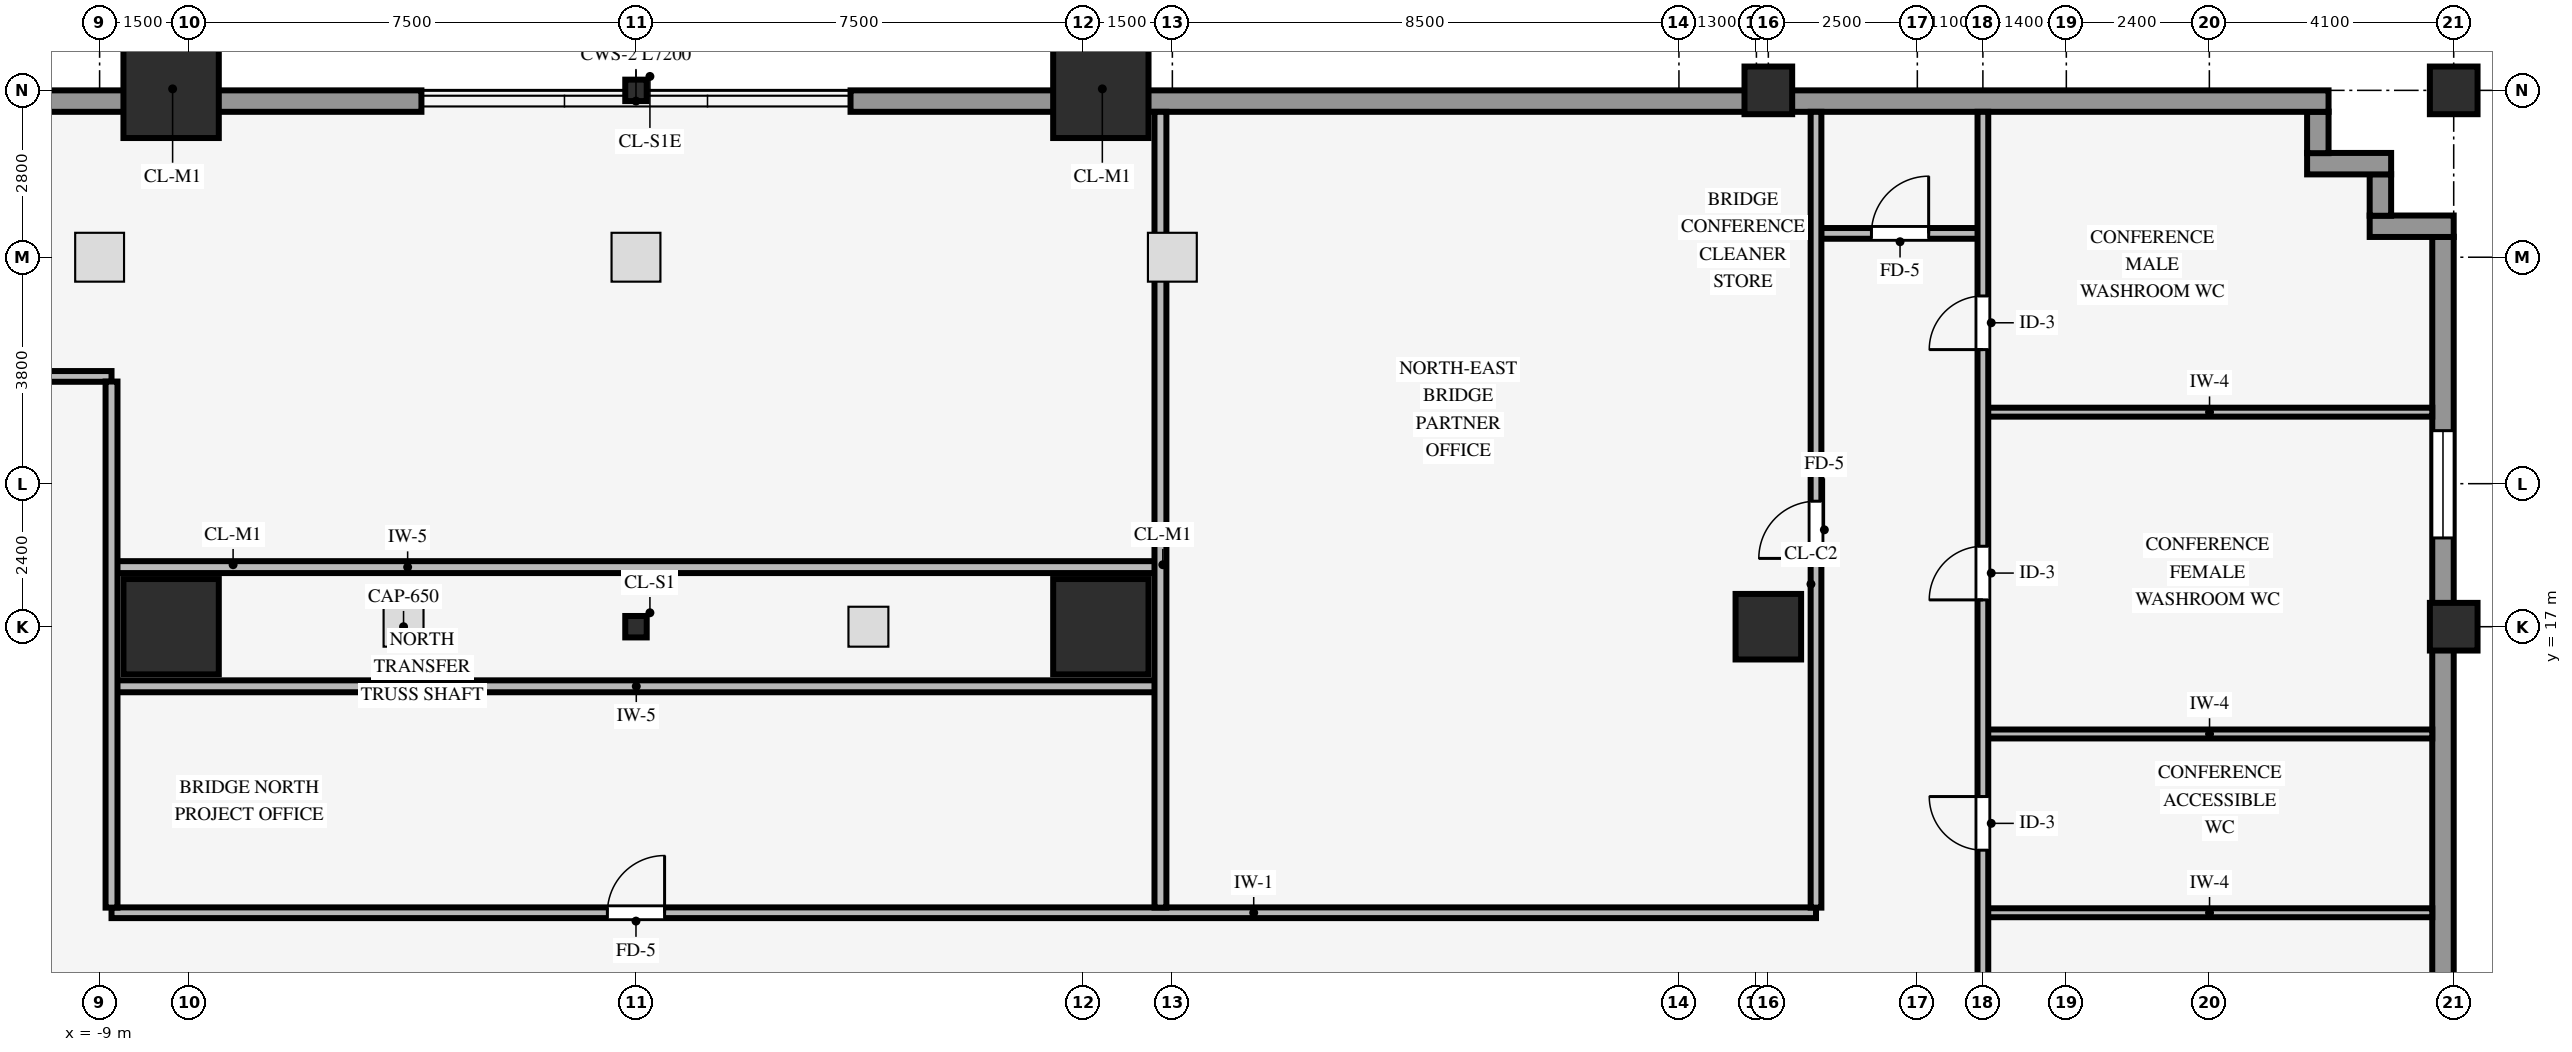
"""IFC4 building model, lengths in metres.
Left out: names, types, materials, properties, quantities, classifications, styles, units other than length and angle.
Written with IfcOpenShell. Run it as: python <this file> out.ifc"""

import sys

from ifc_helpers import new_model, si_unit, direction, frame, frame_2d, origin, origin_2d, place, context, subcontext, project, spatial, rectangle, hollow_rectangle, i_section, extrude, source, transform, mapped, element, fill, save


model = new_model("IFC4")
c1 = context("Model", 3, precision=1e-05, world=origin(), true_north=direction((0.0, 1.0)))
c2 = subcontext(c1, "Body", "Model", "MODEL_VIEW")
j1 = project(units=[si_unit("LENGTHUNIT", "METRE"), si_unit("PLANEANGLEUNIT", "RADIAN")], contexts=[c1])
p1 = place(None, origin())
s1 = spatial("IfcSite", under=j1, at=p1, CompositionType="ELEMENT")
p2 = place(p1, origin())
s2 = spatial("IfcBuilding", under=s1, at=p2, CompositionType="ELEMENT")
p3 = place(p2, frame((0.0, 0.0, 23.0)))
s3 = spatial("IfcBuildingStorey", under=s2, at=p3, CompositionType="ELEMENT", Elevation=23.0)
for number, where, z_axis, x_axis in (
    (1, (-7.8, 17.0, 0.0), (0.0, 0.0, 1.0), (1.0, 0.0, 0.0)),
    (2, (-7.8, 26.0, 0.0), (0.0, 0.0, 1.0), (1.0, 0.0, 0.0)),
    (3, (7.8, 17.0, 0.0), (0.0, 0.0, 1.0), (1.0, 0.0, 0.0)),
    (4, (7.8, 26.0, 0.0), (0.0, 0.0, 1.0), (1.0, 0.0, 0.0)),
):
    element("IfcColumn", number, at=place(p3, frame(where, z_axis=z_axis, x_axis=x_axis)), inside=s3, PredefinedType="COLUMN", context=c2, shape_type="SweptSolid", body=[
        extrude(rectangle(XDim=1.6, YDim=1.6, at=origin_2d()), origin(), (0.0, 0.0, 1.0), 4.2),
    ])
p4 = place(p3, frame((19.0, 17.0, 0.0), z_axis=(0.0, 0.0, 1.0), x_axis=(1.0, 0.0, 0.0)))
e5 = element("IfcColumn", 5, at=p4, inside=s3, PredefinedType="COLUMN", context=c2, shape_type="SweptSolid", body=[
    extrude(rectangle(XDim=1.1, YDim=1.1, at=origin_2d()), origin(), (0.0, 0.0, 1.0), 4.2),
])
for number, where, z_axis, x_axis in (
    (6, (19.0, 26.0, 0.0), (0.0, 0.0, 1.0), (1.0, 0.0, 0.0)),
    (7, (30.5, 17.0, 0.0), (0.0, 0.0, 1.0), (1.0, 0.0, 0.0)),
):
    element("IfcColumn", number, at=place(p3, frame(where, z_axis=z_axis, x_axis=x_axis)), inside=s3, PredefinedType="COLUMN", context=c2, shape_type="SweptSolid", body=[
        extrude(hollow_rectangle(XDim=0.8, YDim=0.8, WallThickness=0.055, InnerFilletRadius=0.055, OuterFilletRadius=0.11, at=origin_2d()), origin(), (0.0, 0.0, 1.0), 4.2),
    ])
p5 = place(p3, frame((30.5, 26.0, -0.4), z_axis=(0.0, 0.0, 1.0), x_axis=(1.0, 0.0, 0.0)))
e8 = element("IfcColumn", 8, at=p5, inside=s3, PredefinedType="COLUMN", context=c2, shape_type="SweptSolid", body=[
    extrude(hollow_rectangle(XDim=0.8, YDim=0.8, WallThickness=0.055, InnerFilletRadius=0.055, OuterFilletRadius=0.11, at=origin_2d()), origin(), (0.0, 0.0, 1.0), 4.6),
])
for number, where, z_axis, x_axis in (
    (9, (0.0, 17.0, 0.0), (0.0, 0.0, 1.0), (1.0, 0.0, 0.0)),
    (10, (0.0, 26.0, 0.0), (0.0, 0.0, 1.0), (1.0, 0.0, 0.0)),
):
    element("IfcColumn", number, at=place(p3, frame(where, z_axis=z_axis, x_axis=x_axis)), inside=s3, PredefinedType="COLUMN", context=c2, shape_type="SweptSolid", body=[
        extrude(i_section(OverallWidth=0.36, OverallDepth=0.36, WebThickness=0.021, FlangeThickness=0.021, FilletRadius=0.018, at=origin_2d()), origin(), (0.0, 0.0, 1.0), 4.2),
    ])
p6 = place(p3, frame((30.32, -23.544, 0.0), z_axis=(0.0, 0.0, 1.0), x_axis=(0.0, 1.0, 0.0)))
e11 = element("IfcWall", 11, at=p6, inside=s3, PredefinedType="STANDARD", context=c2, shape_type="SweptSolid", body=[
    extrude(rectangle(XDim=47.088, YDim=0.36, at=frame_2d((23.544, 0.0))), origin(), (0.0, 0.0, 1.0), 3.702),
])
p7 = place(p6, frame((2.354, 0.0, 0.85)))
e12 = element("IfcOpeningElement", 12, at=p7, cuts=e11, PredefinedType="OPENING", context=c2, shape_type="SweptSolid", body=[
    extrude(rectangle(XDim=1.8, YDim=2.35, at=frame_2d((0.9, 1.175))), frame((0.0, 0.19, 0.0), z_axis=(0.0, -1.0, 0.0), x_axis=(1.0, 0.0, 0.0)), (0.0, 0.0, 1.0), 0.38),
])
p8 = place(p6, frame((7.313, 0.0, 0.85)))
e13 = element("IfcOpeningElement", 13, at=p8, cuts=e11, PredefinedType="OPENING", context=c2, shape_type="SweptSolid", body=[
    extrude(rectangle(XDim=1.8, YDim=2.35, at=frame_2d((0.9, 1.175))), frame((0.0, 0.19, 0.0), z_axis=(0.0, -1.0, 0.0), x_axis=(1.0, 0.0, 0.0)), (0.0, 0.0, 1.0), 0.38),
])
p9 = place(p6, frame((11.372, 0.0, 0.85)))
e14 = element("IfcOpeningElement", 14, at=p9, cuts=e11, PredefinedType="OPENING", context=c2, shape_type="SweptSolid", body=[
    extrude(rectangle(XDim=1.8, YDim=2.35, at=frame_2d((0.9, 1.175))), frame((0.0, 0.19, 0.0), z_axis=(0.0, -1.0, 0.0), x_axis=(1.0, 0.0, 0.0)), (0.0, 0.0, 1.0), 0.38),
])
p10 = place(p6, frame((15.881, 0.0, 0.85)))
e15 = element("IfcOpeningElement", 15, at=p10, cuts=e11, PredefinedType="OPENING", context=c2, shape_type="SweptSolid", body=[
    extrude(rectangle(XDim=1.8, YDim=2.35, at=frame_2d((0.9, 1.175))), frame((0.0, 0.19, 0.0), z_axis=(0.0, -1.0, 0.0), x_axis=(1.0, 0.0, 0.0)), (0.0, 0.0, 1.0), 0.38),
])
p11 = place(p6, frame((20.39, 0.0, 0.85)))
e16 = element("IfcOpeningElement", 16, at=p11, cuts=e11, PredefinedType="OPENING", context=c2, shape_type="SweptSolid", body=[
    extrude(rectangle(XDim=1.8, YDim=2.35, at=frame_2d((0.9, 1.175))), frame((0.0, 0.19, 0.0), z_axis=(0.0, -1.0, 0.0), x_axis=(1.0, 0.0, 0.0)), (0.0, 0.0, 1.0), 0.38),
])
p12 = place(p6, frame((24.898, 0.0, 0.85)))
e17 = element("IfcOpeningElement", 17, at=p12, cuts=e11, PredefinedType="OPENING", context=c2, shape_type="SweptSolid", body=[
    extrude(rectangle(XDim=1.8, YDim=2.35, at=frame_2d((0.9, 1.175))), frame((0.0, 0.19, 0.0), z_axis=(0.0, -1.0, 0.0), x_axis=(1.0, 0.0, 0.0)), (0.0, 0.0, 1.0), 0.38),
])
p13 = place(p6, frame((29.407, 0.0, 0.85)))
e18 = element("IfcOpeningElement", 18, at=p13, cuts=e11, PredefinedType="OPENING", context=c2, shape_type="SweptSolid", body=[
    extrude(rectangle(XDim=1.8, YDim=2.35, at=frame_2d((0.9, 1.175))), frame((0.0, 0.19, 0.0), z_axis=(0.0, -1.0, 0.0), x_axis=(1.0, 0.0, 0.0)), (0.0, 0.0, 1.0), 0.38),
])
p14 = place(p6, frame((42.034, 0.0, 0.85)))
e19 = element("IfcOpeningElement", 19, at=p14, cuts=e11, PredefinedType="OPENING", context=c2, shape_type="SweptSolid", body=[
    extrude(rectangle(XDim=1.8, YDim=2.35, at=frame_2d((0.9, 1.175))), frame((0.0, 0.19, 0.0), z_axis=(0.0, -1.0, 0.0), x_axis=(1.0, 0.0, 0.0)), (0.0, 0.0, 1.0), 0.38),
])
p15 = place(p3, frame((29.09, 23.72, 0.0), z_axis=(0.0, 0.0, 1.0), x_axis=(1.0, 0.0, 0.0)))
e20 = element("IfcWall", 20, at=p15, inside=s3, PredefinedType="STANDARD", context=c2, shape_type="SweptSolid", body=[
    extrude(rectangle(XDim=1.41, YDim=0.36, at=frame_2d((0.705, 0.0))), origin(), (0.0, 0.0, 1.0), 4.19),
])
p16 = place(p3, frame((29.27, 23.896, 0.0), z_axis=(0.0, 0.0, 1.0), x_axis=(0.0, 1.0, 0.0)))
e21 = element("IfcWall", 21, at=p16, inside=s3, PredefinedType="STANDARD", context=c2, shape_type="SweptSolid", body=[
    extrude(rectangle(XDim=0.698, YDim=0.36, at=frame_2d((0.349, 0.0))), origin(), (0.0, 0.0, 1.0), 4.19),
])
p17 = place(p3, frame((28.04, 24.77, 0.0), z_axis=(0.0, 0.0, 1.0), x_axis=(1.0, 0.0, 0.0)))
e22 = element("IfcWall", 22, at=p17, inside=s3, PredefinedType="STANDARD", context=c2, shape_type="SweptSolid", body=[
    extrude(rectangle(XDim=1.41, YDim=0.36, at=frame_2d((0.705, 0.0))), origin(), (0.0, 0.0, 1.0), 4.19),
])
p18 = place(p3, frame((28.22, 24.946, 0.0), z_axis=(0.0, 0.0, 1.0), x_axis=(0.0, 1.0, 0.0)))
e23 = element("IfcWall", 23, at=p18, inside=s3, PredefinedType="STANDARD", context=c2, shape_type="SweptSolid", body=[
    extrude(rectangle(XDim=0.698, YDim=0.36, at=frame_2d((0.349, 0.0))), origin(), (0.0, 0.0, 1.0), 4.19),
])
for number, where, z_axis, x_axis in (
    (24, (-28.4, 25.82, 0.0), (0.0, 0.0, 1.0), (1.0, 0.0, 0.0)),
    (25, (3.6, 25.82, 0.0), (0.0, 0.0, 1.0), (1.0, 0.0, 0.0)),
):
    element("IfcWall", number, at=place(p3, frame(where, z_axis=z_axis, x_axis=x_axis)), inside=s3, PredefinedType="STANDARD", context=c2, shape_type="SweptSolid", body=[
        extrude(rectangle(XDim=24.8, YDim=0.36, at=frame_2d((12.4, 0.0))), origin(), (0.0, 0.0, 1.0), 2.785),
    ])
p19 = place(p3, frame((-8.8, 12.2, 0.0), z_axis=(0.0, 0.0, 1.0), x_axis=(1.0, 0.0, 0.0)))
e26 = element("IfcWall", 26, at=p19, inside=s3, PredefinedType="PARTITIONING", context=c2, shape_type="SweptSolid", body=[
    extrude(rectangle(XDim=28.6, YDim=0.18, at=frame_2d((14.3, 0.0))), origin(), (0.0, 0.0, 1.0), 4.19),
])
p20 = place(p19, frame((8.32, 0.0, 0.0)))
e27 = element("IfcOpeningElement", 27, at=p20, cuts=e26, PredefinedType="OPENING", context=c2, shape_type="SweptSolid", body=[
    extrude(rectangle(XDim=0.96, YDim=2.1, at=frame_2d((0.48, 1.05))), frame((0.0, 0.1, 0.0), z_axis=(0.0, -1.0, 0.0), x_axis=(1.0, 0.0, 0.0)), (0.0, 0.0, 1.0), 0.2),
])
for number, where, z_axis, x_axis in (
    (28, (22.666, 12.2, 0.0), (0.0, 0.0, 1.0), (1.0, 0.0, 0.0)),
    (29, (22.666, 15.2, 0.0), (0.0, 0.0, 1.0), (1.0, 0.0, 0.0)),
):
    element("IfcWall", number, at=place(p3, frame(where, z_axis=z_axis, x_axis=x_axis)), inside=s3, PredefinedType="PARTITIONING", context=c2, shape_type="SweptSolid", body=[
        extrude(rectangle(XDim=7.474, YDim=0.15, at=frame_2d((3.737, 0.0))), origin(), (0.0, 0.0, 1.0), 4.19),
    ])
for number, where, z_axis, x_axis in (
    (30, (-8.714, 16.0, 0.0), (0.0, 0.0, 1.0), (1.0, 0.0, 0.0)),
    (31, (-8.714, 18.0, 0.0), (0.0, 0.0, 1.0), (1.0, 0.0, 0.0)),
):
    element("IfcWall", number, at=place(p3, frame(where, z_axis=z_axis, x_axis=x_axis)), inside=s3, PredefinedType="STANDARD", context=c2, shape_type="SweptSolid", body=[
        extrude(rectangle(XDim=17.438, YDim=0.2, at=frame_2d((8.719, 0.0))), origin(), (0.0, 0.0, 1.0), 4.19),
    ])
p21 = place(p3, frame((22.666, 20.6, 0.0), z_axis=(0.0, 0.0, 1.0), x_axis=(1.0, 0.0, 0.0)))
e32 = element("IfcWall", 32, at=p21, inside=s3, PredefinedType="PARTITIONING", context=c2, shape_type="SweptSolid", body=[
    extrude(rectangle(XDim=7.474, YDim=0.15, at=frame_2d((3.737, 0.0))), origin(), (0.0, 0.0, 1.0), 4.19),
])
p22 = place(p3, frame((-11.4, 21.2, 0.0), z_axis=(0.0, 0.0, 1.0), x_axis=(1.0, 0.0, 0.0)))
e33 = element("IfcWall", 33, at=p22, inside=s3, PredefinedType="PARTITIONING", context=c2, shape_type="SweptSolid", body=[
    extrude(rectangle(XDim=2.6, YDim=0.18, at=frame_2d((1.3, 0.0))), origin(), (0.0, 0.0, 1.0), 4.19),
])
p23 = place(p3, frame((19.886, 23.6, 0.0), z_axis=(0.0, 0.0, 1.0), x_axis=(1.0, 0.0, 0.0)))
e34 = element("IfcWall", 34, at=p23, inside=s3, PredefinedType="PARTITIONING", context=c2, shape_type="SweptSolid", body=[
    extrude(rectangle(XDim=2.648, YDim=0.18, at=frame_2d((1.324, 0.0))), origin(), (0.0, 0.0, 1.0), 4.19),
])
p24 = place(p23, frame((0.844, 0.0, 0.0)))
e35 = element("IfcOpeningElement", 35, at=p24, cuts=e34, PredefinedType="OPENING", context=c2, shape_type="SweptSolid", body=[
    extrude(rectangle(XDim=0.96, YDim=2.1, at=frame_2d((0.48, 1.05))), frame((0.0, 0.1, 0.0), z_axis=(0.0, -1.0, 0.0), x_axis=(1.0, 0.0, 0.0)), (0.0, 0.0, 1.0), 0.2),
])
p25 = place(p3, frame((-8.8, 12.286, 0.0), z_axis=(0.0, 0.0, 1.0), x_axis=(0.0, 1.0, 0.0)))
e36 = element("IfcWall", 36, at=p25, inside=s3, PredefinedType="STANDARD", context=c2, shape_type="SweptSolid", body=[
    extrude(rectangle(XDim=8.828, YDim=0.2, at=frame_2d((4.414, 0.0))), origin(), (0.0, 0.0, 1.0), 2.785),
])
p26 = place(p3, frame((8.8, 12.286, 0.0), z_axis=(0.0, 0.0, 1.0), x_axis=(0.0, 1.0, 0.0)))
e37 = element("IfcWall", 37, at=p26, inside=s3, PredefinedType="STANDARD", context=c2, shape_type="SweptSolid", body=[
    extrude(rectangle(XDim=13.354, YDim=0.2, at=frame_2d((6.677, 0.0))), origin(), (0.0, 0.0, 1.0), 2.785),
])
p27 = place(p3, frame((19.8, 12.286, 0.0), z_axis=(0.0, 0.0, 1.0), x_axis=(0.0, 1.0, 0.0)))
e38 = element("IfcWall", 38, at=p27, inside=s3, PredefinedType="PARTITIONING", context=c2, shape_type="SweptSolid", body=[
    extrude(rectangle(XDim=13.354, YDim=0.18, at=frame_2d((6.677, 0.0))), origin(), (0.0, 0.0, 1.0), 4.19),
])
p28 = place(p27, frame((5.86, 0.0, 0.0)))
e39 = element("IfcOpeningElement", 39, at=p28, cuts=e38, PredefinedType="OPENING", context=c2, shape_type="SweptSolid", body=[
    extrude(rectangle(XDim=0.96, YDim=2.1, at=frame_2d((0.48, 1.05))), frame((0.0, 0.1, 0.0), z_axis=(0.0, -1.0, 0.0), x_axis=(1.0, 0.0, 0.0)), (0.0, 0.0, 1.0), 0.2),
])
p29 = place(p3, frame((22.6, -25.64, 0.0), z_axis=(0.0, 0.0, 1.0), x_axis=(0.0, 1.0, 0.0)))
e40 = element("IfcWall", 40, at=p29, inside=s3, PredefinedType="PARTITIONING", context=c2, shape_type="SweptSolid", body=[
    extrude(rectangle(XDim=51.28, YDim=0.18, at=frame_2d((25.64, 0.0))), origin(), (0.0, 0.0, 1.0), 4.19),
])
p30 = place(p29, frame((25.16, 0.0, 0.0)))
e41 = element("IfcOpeningElement", 41, at=p30, cuts=e40, PredefinedType="OPENING", context=c2, shape_type="SweptSolid", body=[
    extrude(rectangle(XDim=0.96, YDim=2.1, at=frame_2d((0.48, 1.05))), frame((0.0, 0.1, 0.0), z_axis=(0.0, -1.0, 0.0), x_axis=(1.0, 0.0, 0.0)), (0.0, 0.0, 1.0), 0.2),
])
p31 = place(p29, frame((43.09, 0.0, 0.0)))
e42 = element("IfcOpeningElement", 42, at=p31, cuts=e40, PredefinedType="OPENING", context=c2, shape_type="SweptSolid", body=[
    extrude(rectangle(XDim=0.9, YDim=2.1, at=frame_2d((0.45, 1.05))), frame((0.0, 0.1, 0.0), z_axis=(0.0, -1.0, 0.0), x_axis=(1.0, 0.0, 0.0)), (0.0, 0.0, 1.0), 0.2),
])
p32 = place(p29, frame((38.89, 0.0, 0.0)))
e43 = element("IfcOpeningElement", 43, at=p32, cuts=e40, PredefinedType="OPENING", context=c2, shape_type="SweptSolid", body=[
    extrude(rectangle(XDim=0.9, YDim=2.1, at=frame_2d((0.45, 1.05))), frame((0.0, 0.1, 0.0), z_axis=(0.0, -1.0, 0.0), x_axis=(1.0, 0.0, 0.0)), (0.0, 0.0, 1.0), 0.2),
])
p33 = place(p29, frame((47.29, 0.0, 0.0)))
e44 = element("IfcOpeningElement", 44, at=p33, cuts=e40, PredefinedType="OPENING", context=c2, shape_type="SweptSolid", body=[
    extrude(rectangle(XDim=0.9, YDim=2.1, at=frame_2d((0.45, 1.05))), frame((0.0, 0.1, 0.0), z_axis=(0.0, -1.0, 0.0), x_axis=(1.0, 0.0, 0.0)), (0.0, 0.0, 1.0), 0.2),
])
m1 = source(origin(), c2, "Body", "SweptSolid", [
    extrude(rectangle(XDim=1.8, YDim=2.35, at=frame_2d((0.9, 1.175))), frame((0.0, 0.03, 0.0), z_axis=(0.0, -1.0, 0.0), x_axis=(1.0, 0.0, 0.0)), (0.0, 0.0, 1.0), 0.06),
])
p34 = place(p14, origin())
e45 = element("IfcWindow", 45, at=p34, inside=s3, PartitioningType="SINGLE_PANEL", PredefinedType="WINDOW", context=c2, shape_type="MappedRepresentation", body=[
    mapped(m1, transform((0.0, 0.0, 0.0), scale=1.0)),
])
fill(e19, e45)
m2 = source(origin(), c2, "Body", "SweptSolid", [
    extrude(rectangle(XDim=0.96, YDim=2.1, at=frame_2d((0.48, 1.05))), frame((0.0, 0.025, 0.0), z_axis=(0.0, -1.0, 0.0), x_axis=(1.0, 0.0, 0.0)), (0.0, 0.0, 1.0), 0.05),
])
p35 = place(p20, origin())
e46 = element("IfcDoor", 46, at=p35, inside=s3, OperationType="SINGLE_SWING_RIGHT", PredefinedType="DOOR", context=c2, shape_type="MappedRepresentation", body=[
    mapped(m2, transform((0.0, 0.0, 0.0), scale=1.0)),
])
fill(e27, e46)
p36 = place(p28, origin())
e47 = element("IfcDoor", 47, at=p36, inside=s3, OperationType="SINGLE_SWING_LEFT", PredefinedType="DOOR", context=c2, shape_type="MappedRepresentation", body=[
    mapped(m2, transform((0.0, 0.0, 0.0), scale=1.0)),
])
fill(e39, e47)
m3 = source(origin(), c2, "Body", "SweptSolid", [
    extrude(rectangle(XDim=0.9, YDim=2.1, at=frame_2d((0.45, 1.05))), frame((0.0, 0.025, 0.0), z_axis=(0.0, -1.0, 0.0), x_axis=(1.0, 0.0, 0.0)), (0.0, 0.0, 1.0), 0.05),
])
p37 = place(p31, origin())
e48 = element("IfcDoor", 48, at=p37, inside=s3, OperationType="SINGLE_SWING_LEFT", PredefinedType="DOOR", context=c2, shape_type="MappedRepresentation", body=[
    mapped(m3, transform((0.0, 0.0, 0.0), scale=1.0)),
])
fill(e42, e48)
p38 = place(p32, origin())
e49 = element("IfcDoor", 49, at=p38, inside=s3, OperationType="SINGLE_SWING_RIGHT", PredefinedType="DOOR", context=c2, shape_type="MappedRepresentation", body=[
    mapped(m3, transform((0.0, 0.0, 0.0), scale=1.0)),
])
fill(e43, e49)
p39 = place(p33, origin())
e50 = element("IfcDoor", 50, at=p39, inside=s3, OperationType="SINGLE_SWING_LEFT", PredefinedType="DOOR", context=c2, shape_type="MappedRepresentation", body=[
    mapped(m3, transform((0.0, 0.0, 0.0), scale=1.0)),
])
fill(e44, e50)
p40 = place(p24, origin())
e51 = element("IfcDoor", 51, at=p40, inside=s3, OperationType="SINGLE_SWING_RIGHT", PredefinedType="DOOR", context=c2, shape_type="MappedRepresentation", body=[
    mapped(m2, transform((0.0, 0.0, 0.0), scale=1.0)),
])
fill(e35, e51)
save(model, sys.argv[1])
